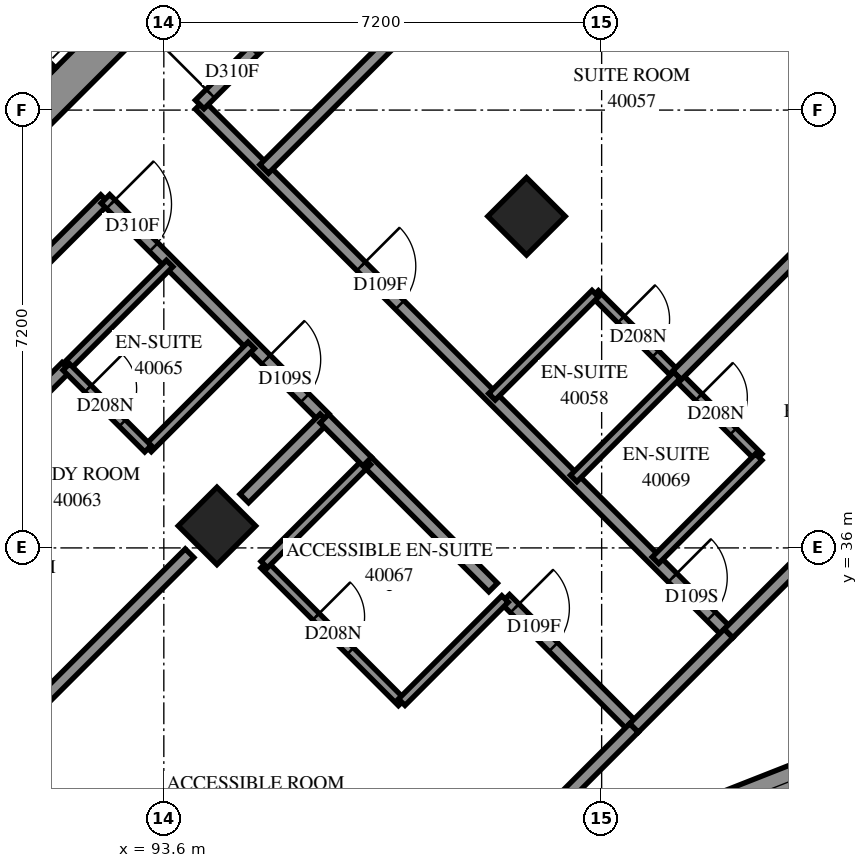
"""IFC4 building model, lengths in metres.
Left out: names, types, materials, properties, quantities, classifications, styles, units other than length and angle.
Written with IfcOpenShell. Run it as: python <this file> out.ifc"""

import sys

from ifc_helpers import new_model, si_unit, direction, frame, frame_2d, origin, origin_2d, place, context, subcontext, project, spatial, polyline, rectangle, outline, extrude, element, fill, save


model = new_model("IFC4")
c1 = context("Model", 3, precision=1e-05, world=origin(), true_north=direction((0.0, 1.0)))
c2 = subcontext(c1, "Body", "Model", "MODEL_VIEW")
j1 = project(units=[si_unit("LENGTHUNIT", "METRE"), si_unit("PLANEANGLEUNIT", "RADIAN")], contexts=[c1])
p1 = place(None, origin())
s1 = spatial("IfcSite", under=j1, at=p1, CompositionType="ELEMENT")
p2 = place(p1, origin())
s2 = spatial("IfcBuilding", under=s1, at=p2, CompositionType="ELEMENT")
p3 = place(p2, frame((0.0, 0.0, 149.0)))
s3 = spatial("IfcBuildingStorey", under=s2, at=p3, CompositionType="ELEMENT", Elevation=149.0)
for number, where, z_axis, x_axis in (
    (1, (99.565, 41.453, 0.0), (0.0, 0.0, 1.0), (0.707, -0.707, 0.0)),
    (2, (94.474, 36.362, 0.0), (0.0, 0.0, 1.0), (0.707, -0.707, 0.0)),
):
    element("IfcColumn", number, at=place(p3, frame(where, z_axis=z_axis, x_axis=x_axis)), inside=s3, PredefinedType="COLUMN", context=c2, shape_type="SweptSolid", body=[
        extrude(rectangle(XDim=0.9, YDim=0.9, at=origin_2d()), origin(), (0.0, 0.0, 1.0), 3.1),
    ])
p4 = place(p3, frame((87.049, 38.695, -0.3), z_axis=(0.0, 0.0, 1.0), x_axis=(0.7071067812, 0.7071067812, 0.0)))
e3 = element("IfcWall", 3, at=p4, inside=s3, PredefinedType="SHEAR", context=c2, shape_type="SweptSolid", body=[
    extrude(rectangle(XDim=14.4, YDim=0.6, at=frame_2d((7.2, 0.0))), origin(), (0.0, 0.0, 1.0), 2.7),
])
p5 = place(p4, frame((4.55, 0.0, 0.3)))
e4 = element("IfcOpeningElement", 4, at=p5, cuts=e3, PredefinedType="OPENING", context=c2, shape_type="SweptSolid", body=[
    extrude(rectangle(XDim=1.1, YDim=2.1, at=frame_2d((0.55, 1.05))), frame((0.0, 0.31, 0.0), z_axis=(0.0, -1.0, 0.0), x_axis=(1.0, 0.0, 0.0)), (0.0, 0.0, 1.0), 0.62),
])
p6 = place(p4, frame((11.35, 0.0, 0.3)))
e5 = element("IfcOpeningElement", 5, at=p6, cuts=e3, PredefinedType="OPENING", context=c2, shape_type="SweptSolid", body=[
    extrude(rectangle(XDim=1.1, YDim=2.1, at=frame_2d((0.55, 1.05))), frame((0.0, 0.31, 0.0), z_axis=(0.0, -1.0, 0.0), x_axis=(1.0, 0.0, 0.0)), (0.0, 0.0, 1.0), 0.62),
])
p7 = place(p3, frame((81.534, 53.969, 0.0), z_axis=(0.0, 0.0, 1.0), x_axis=(0.707103309, -0.7071102534, 0.0)))
e6 = element("IfcWall", 6, at=p7, inside=s3, PredefinedType="SOLIDWALL", context=c2, shape_type="SweptSolid", body=[
    extrude(rectangle(XDim=14.4, YDim=0.3, at=frame_2d((7.2, 0.0))), origin(), (0.0, 0.0, 1.0), 3.1),
])
p8 = place(p7, frame((1.25, 0.0, 0.0)))
e7 = element("IfcOpeningElement", 7, at=p8, cuts=e6, PredefinedType="OPENING", context=c2, shape_type="SweptSolid", body=[
    extrude(rectangle(XDim=1.1, YDim=2.1, at=frame_2d((0.55, 1.05))), frame((0.0, 0.16, 0.0), z_axis=(0.0, -1.0, 0.0), x_axis=(1.0, 0.0, 0.0)), (0.0, 0.0, 1.0), 0.32),
])
p9 = place(p7, frame((4.85, 0.0, 0.0)))
e8 = element("IfcOpeningElement", 8, at=p9, cuts=e6, PredefinedType="OPENING", context=c2, shape_type="SweptSolid", body=[
    extrude(rectangle(XDim=1.1, YDim=2.1, at=frame_2d((0.55, 1.05))), frame((0.0, 0.16, 0.0), z_axis=(0.0, -1.0, 0.0), x_axis=(1.0, 0.0, 0.0)), (0.0, 0.0, 1.0), 0.32),
])
p10 = place(p7, frame((8.45, 0.0, 0.0)))
e9 = element("IfcOpeningElement", 9, at=p10, cuts=e6, PredefinedType="OPENING", context=c2, shape_type="SweptSolid", body=[
    extrude(rectangle(XDim=1.1, YDim=2.1, at=frame_2d((0.55, 1.05))), frame((0.0, 0.16, 0.0), z_axis=(0.0, -1.0, 0.0), x_axis=(1.0, 0.0, 0.0)), (0.0, 0.0, 1.0), 0.32),
])
p11 = place(p7, frame((12.05, 0.0, 0.0)))
e10 = element("IfcOpeningElement", 10, at=p11, cuts=e6, PredefinedType="OPENING", context=c2, shape_type="SweptSolid", body=[
    extrude(rectangle(XDim=1.1, YDim=2.1, at=frame_2d((0.55, 1.05))), frame((0.0, 0.16, 0.0), z_axis=(0.0, -1.0, 0.0), x_axis=(1.0, 0.0, 0.0)), (0.0, 0.0, 1.0), 0.32),
])
p12 = place(p3, frame((100.849, 30.961, 0.0), z_axis=(0.0, 0.0, 1.0), x_axis=(0.9305330954, 0.3662078077, 0.0)))
e11 = element("IfcWall", 11, at=p12, inside=s3, PredefinedType="SOLIDWALL", context=c2, shape_type="SweptSolid", body=[
    extrude(outline(polyline([(0.109, -0.25), (5.622, -0.25), (5.395, 0.25), (-0.109, 0.25), (0.109, -0.25)])), origin(), (0.0, 0.0, 1.0), 3.1),
])
p13 = place(p12, frame((0.608, 0.0, 0.45)))
e12 = element("IfcOpeningElement", 12, at=p13, cuts=e11, PredefinedType="OPENING", context=c2, shape_type="SweptSolid", body=[
    extrude(rectangle(XDim=2.8, YDim=2.5, at=frame_2d((1.4, 1.25))), frame((0.0, 0.26, 0.0), z_axis=(0.0, -1.0, 0.0), x_axis=(1.0, 0.0, 0.0)), (0.0, 0.0, 1.0), 0.52),
])
p14 = place(p3, frame((94.189, 43.287, 0.0), z_axis=(0.0, 0.0, 1.0), x_axis=(0.7071067812, -0.7071067812, 0.0)))
e13 = element("IfcWall", 13, at=p14, inside=s3, PredefinedType="PARTITIONING", context=c2, shape_type="SweptSolid", body=[
    extrude(rectangle(XDim=12.298, YDim=0.2, at=frame_2d((6.149, 0.0))), origin(), (0.0, 0.0, 1.0), 3.1),
])
p15 = place(p14, frame((3.755, 0.0, 0.0)))
e14 = element("IfcOpeningElement", 14, at=p15, cuts=e13, PredefinedType="OPENING", context=c2, shape_type="SweptSolid", body=[
    extrude(rectangle(XDim=0.9, YDim=2.1, at=frame_2d((0.45, 1.05))), frame((0.0, 0.11, 0.0), z_axis=(0.0, -1.0, 0.0), x_axis=(1.0, 0.0, 0.0)), (0.0, 0.0, 1.0), 0.22),
])
p16 = place(p14, frame((10.998, 0.0, 0.0)))
e15 = element("IfcOpeningElement", 15, at=p16, cuts=e13, PredefinedType="OPENING", context=c2, shape_type="SweptSolid", body=[
    extrude(rectangle(XDim=0.9, YDim=2.1, at=frame_2d((0.45, 1.05))), frame((0.0, 0.11, 0.0), z_axis=(0.0, -1.0, 0.0), x_axis=(1.0, 0.0, 0.0)), (0.0, 0.0, 1.0), 0.22),
])
p17 = place(p3, frame((95.25, 42.232, 0.0), z_axis=(0.0, 0.0, 1.0), x_axis=(0.7071114274, 0.7071021349, 0.0)))
e16 = element("IfcWall", 16, at=p17, inside=s3, PredefinedType="PARTITIONING", context=c2, shape_type="SweptSolid", body=[
    extrude(rectangle(XDim=10.761, YDim=0.2, at=frame_2d((5.381, 0.0))), origin(), (0.0, 0.0, 1.0), 3.1),
])
p18 = place(p3, frame((94.19, 43.292, 0.0), z_axis=(0.0, 0.0, 1.0), x_axis=(0.7071067812, 0.7071067812, 0.0)))
e17 = element("IfcWall", 17, at=p18, inside=s3, PredefinedType="PARTITIONING", context=c2, shape_type="SweptSolid", body=[
    extrude(rectangle(XDim=8.2, YDim=0.2, at=frame_2d((4.1, 0.0))), origin(), (0.0, 0.0, 1.0), 3.1),
])
p19 = place(p18, frame((0.251, 0.0, 0.0)))
e18 = element("IfcOpeningElement", 18, at=p19, cuts=e17, PredefinedType="OPENING", context=c2, shape_type="SweptSolid", body=[
    extrude(rectangle(XDim=1.0, YDim=2.1, at=frame_2d((0.5, 1.05))), frame((0.0, 0.11, 0.0), z_axis=(0.0, -1.0, 0.0), x_axis=(1.0, 0.0, 0.0)), (0.0, 0.0, 1.0), 0.22),
])
p20 = place(p3, frame((86.836, 35.938, 0.0), z_axis=(0.0, 0.0, 1.0), x_axis=(0.7071067812, 0.7071067812, 0.0)))
e19 = element("IfcWall", 19, at=p20, inside=s3, PredefinedType="PARTITIONING", context=c2, shape_type="SweptSolid", body=[
    extrude(rectangle(XDim=8.2, YDim=0.2, at=frame_2d((4.1, 0.0))), origin(), (0.0, 0.0, 1.0), 3.1),
])
p21 = place(p3, frame((86.33, 33.311, 0.0), z_axis=(0.0, 0.0, 1.0), x_axis=(0.7071005427, 0.7071130196, 0.0)))
e20 = element("IfcWall", 20, at=p21, inside=s3, PredefinedType="PARTITIONING", context=c2, shape_type="SweptSolid", body=[
    extrude(rectangle(XDim=8.015, YDim=0.2, at=frame_2d((4.007, 0.0))), origin(), (0.0, 0.0, 1.0), 3.1),
])
p22 = place(p3, frame((89.831, 31.721, 0.0), z_axis=(0.0, 0.0, 1.0), x_axis=(0.7071067812, 0.7071067812, 0.0)))
e21 = element("IfcWall", 21, at=p22, inside=s3, PredefinedType="PARTITIONING", context=c2, shape_type="SweptSolid", body=[
    extrude(rectangle(XDim=5.928, YDim=0.2, at=frame_2d((2.964, 0.0))), origin(), (0.0, 0.0, 1.0), 3.1),
])
p23 = place(p3, frame((92.639, 41.739, 0.0), z_axis=(0.0, 0.0, 1.0), x_axis=(0.7071067812, -0.7071067812, 0.0)))
e22 = element("IfcWall", 22, at=p23, inside=s3, PredefinedType="PARTITIONING", context=c2, shape_type="SweptSolid", body=[
    extrude(rectangle(XDim=5.1, YDim=0.2, at=frame_2d((2.55, 0.0))), origin(), (0.0, 0.0, 1.0), 3.1),
])
p24 = place(p23, frame((0.123, 0.0, 0.0)))
e23 = element("IfcOpeningElement", 23, at=p24, cuts=e22, PredefinedType="OPENING", context=c2, shape_type="SweptSolid", body=[
    extrude(rectangle(XDim=1.0, YDim=2.1, at=frame_2d((0.5, 1.05))), frame((0.0, 0.11, 0.0), z_axis=(0.0, -1.0, 0.0), x_axis=(1.0, 0.0, 0.0)), (0.0, 0.0, 1.0), 0.22),
])
p25 = place(p23, frame((3.734, 0.0, 0.0)))
e24 = element("IfcOpeningElement", 24, at=p25, cuts=e22, PredefinedType="OPENING", context=c2, shape_type="SweptSolid", body=[
    extrude(rectangle(XDim=0.9, YDim=2.1, at=frame_2d((0.45, 1.05))), frame((0.0, 0.11, 0.0), z_axis=(0.0, -1.0, 0.0), x_axis=(1.0, 0.0, 0.0)), (0.0, 0.0, 1.0), 0.22),
])
p26 = place(p3, frame((100.694, 40.178, 0.0), z_axis=(0.0, 0.0, 1.0), x_axis=(0.7076329021, -0.7065802685, 0.0)))
e25 = element("IfcWall", 25, at=p26, inside=s3, PredefinedType="PARTITIONING", context=c2, shape_type="SweptSolid", body=[
    extrude(rectangle(XDim=3.8, YDim=0.15, at=frame_2d((1.9, 0.0))), origin(), (0.0, 0.0, 1.0), 3.1),
])
p27 = place(p26, frame((0.598, 0.0, 0.0)))
e26 = element("IfcOpeningElement", 26, at=p27, cuts=e25, PredefinedType="OPENING", context=c2, shape_type="SweptSolid", body=[
    extrude(rectangle(XDim=0.8, YDim=2.1, at=frame_2d((0.4, 1.05))), frame((0.0, 0.085, 0.0), z_axis=(0.0, -1.0, 0.0), x_axis=(1.0, 0.0, 0.0)), (0.0, 0.0, 1.0), 0.17),
])
p28 = place(p26, frame((2.405, 0.0, 0.0)))
e27 = element("IfcOpeningElement", 27, at=p28, cuts=e25, PredefinedType="OPENING", context=c2, shape_type="SweptSolid", body=[
    extrude(rectangle(XDim=0.8, YDim=2.1, at=frame_2d((0.4, 1.05))), frame((0.0, 0.085, 0.0), z_axis=(0.0, -1.0, 0.0), x_axis=(1.0, 0.0, 0.0)), (0.0, 0.0, 1.0), 0.17),
])
p29 = place(p3, frame((95.249, 35.723, 0.0), z_axis=(0.0, 0.0, 1.0), x_axis=(0.7067942478, -0.7074191764, 0.0)))
e28 = element("IfcWall", 28, at=p29, inside=s3, PredefinedType="PARTITIONING", context=c2, shape_type="SweptSolid", body=[
    extrude(rectangle(XDim=3.2, YDim=0.15, at=frame_2d((1.6, 0.0))), origin(), (0.0, 0.0, 1.0), 3.1),
])
p30 = place(p29, frame((1.206, 0.0, 0.0)))
e29 = element("IfcOpeningElement", 29, at=p30, cuts=e28, PredefinedType="OPENING", context=c2, shape_type="SweptSolid", body=[
    extrude(rectangle(XDim=0.8, YDim=2.1, at=frame_2d((0.4, 1.05))), frame((0.0, 0.085, 0.0), z_axis=(0.0, -1.0, 0.0), x_axis=(1.0, 0.0, 0.0)), (0.0, 0.0, 1.0), 0.17),
])
p31 = place(p3, frame((102.04, 38.838, 0.0), z_axis=(0.0, 0.0, 1.0), x_axis=(0.7071067812, 0.7071067812, 0.0)))
e30 = element("IfcWall", 30, at=p31, inside=s3, PredefinedType="PARTITIONING", context=c2, shape_type="SweptSolid", body=[
    extrude(rectangle(XDim=3.199, YDim=0.2, at=frame_2d((1.599, 0.0))), origin(), (0.0, 0.0, 1.0), 3.1),
])
p32 = place(p3, frame((99.214, 35.162, 0.0), z_axis=(0.0, 0.0, 1.0), x_axis=(0.706773319, -0.7074400862, 0.0)))
e31 = element("IfcWall", 31, at=p32, inside=s3, PredefinedType="PARTITIONING", context=c2, shape_type="SweptSolid", body=[
    extrude(rectangle(XDim=2.999, YDim=0.2, at=frame_2d((1.5, 0.0))), origin(), (0.0, 0.0, 1.0), 3.1),
])
p33 = place(p32, frame((0.22, 0.0, 0.0)))
e32 = element("IfcOpeningElement", 32, at=p33, cuts=e31, PredefinedType="OPENING", context=c2, shape_type="SweptSolid", body=[
    extrude(rectangle(XDim=0.9, YDim=2.1, at=frame_2d((0.45, 1.05))), frame((0.0, 0.11, 0.0), z_axis=(0.0, -1.0, 0.0), x_axis=(1.0, 0.0, 0.0)), (0.0, 0.0, 1.0), 0.22),
])
p34 = place(p3, frame((96.945, 37.419, 0.0), z_axis=(0.0, 0.0, 1.0), x_axis=(0.7071067812, -0.7071067812, 0.0)))
e33 = element("IfcWall", 33, at=p34, inside=s3, PredefinedType="PARTITIONING", context=c2, shape_type="SweptSolid", body=[
    extrude(rectangle(XDim=2.927, YDim=0.2, at=frame_2d((1.464, 0.0))), origin(), (0.0, 0.0, 1.0), 3.1),
])
for number, where, z_axis, x_axis in (
    (34, (97.513, 33.463, 0.0), (0.0, 0.0, 1.0), (0.707, 0.707, 0.0)),
    (35, (93.341, 37.635, 0.0), (0.0, 0.0, 1.0), (0.707, 0.707, 0.0)),
    (36, (101.685, 35.797, 0.0), (0.0, 0.0, 1.0), (0.707, 0.707, 0.0)),
    (37, (91.997, 38.979, 0.0), (0.0, 0.0, 1.0), (0.707, 0.707, 0.0)),
):
    element("IfcWall", number, at=place(p3, frame(where, z_axis=z_axis, x_axis=x_axis)), inside=s3, PredefinedType="PARTITIONING", context=c2, shape_type="SweptSolid", body=[
        extrude(rectangle(XDim=2.401, YDim=0.15, at=frame_2d((1.201, 0.0))), origin(), (0.0, 0.0, 1.0), 3.1),
    ])
for number, where, z_axis, x_axis in (
    (38, (100.34, 37.142, 0.0), (0.0, 0.0, 1.0), (0.708, 0.707, 0.0)),
    (39, (98.996, 38.486, 0.0), (0.0, 0.0, 1.0), (0.708, 0.707, 0.0)),
):
    element("IfcWall", number, at=place(p3, frame(where, z_axis=z_axis, x_axis=x_axis)), inside=s3, PredefinedType="PARTITIONING", context=c2, shape_type="SweptSolid", body=[
        extrude(rectangle(XDim=2.4, YDim=0.15, at=frame_2d((1.2, 0.0))), origin(), (0.0, 0.0, 1.0), 3.1),
    ])
p35 = place(p3, frame((95.251, 35.727, 0.0), z_axis=(0.0, 0.0, 1.0), x_axis=(0.7071067812, 0.7071067812, 0.0)))
e40 = element("IfcWall", 40, at=p35, inside=s3, PredefinedType="PARTITIONING", context=c2, shape_type="SweptSolid", body=[
    extrude(rectangle(XDim=2.398, YDim=0.15, at=frame_2d((1.199, 0.0))), origin(), (0.0, 0.0, 1.0), 3.1),
])
p36 = place(p3, frame((101.331, 33.039, 0.0), z_axis=(0.0, 0.0, 1.0), x_axis=(0.7071067812, 0.7071067812, 0.0)))
e41 = element("IfcWall", 41, at=p36, inside=s3, PredefinedType="PARTITIONING", context=c2, shape_type="SweptSolid", body=[
    extrude(rectangle(XDim=2.2, YDim=0.2, at=frame_2d((1.1, 0.0))), origin(), (0.0, 0.0, 1.0), 2.6),
])
p37 = place(p3, frame((91.995, 38.975, 0.0), z_axis=(0.0, 0.0, 1.0), x_axis=(0.7071067812, -0.7071067812, 0.0)))
e42 = element("IfcWall", 42, at=p37, inside=s3, PredefinedType="PARTITIONING", context=c2, shape_type="SweptSolid", body=[
    extrude(rectangle(XDim=1.901, YDim=0.15, at=frame_2d((0.95, 0.0))), origin(), (0.0, 0.0, 1.0), 3.1),
])
p38 = place(p37, frame((0.506, 0.0, 0.0)))
e43 = element("IfcOpeningElement", 43, at=p38, cuts=e42, PredefinedType="OPENING", context=c2, shape_type="SweptSolid", body=[
    extrude(rectangle(XDim=0.8, YDim=2.1, at=frame_2d((0.4, 1.05))), frame((0.0, 0.085, 0.0), z_axis=(0.0, -1.0, 0.0), x_axis=(1.0, 0.0, 0.0)), (0.0, 0.0, 1.0), 0.17),
])
p39 = place(p3, frame((102.887, 34.595, 0.0), z_axis=(0.0, 0.0, 1.0), x_axis=(0.7071067812, 0.7071067812, 0.0)))
e44 = element("IfcWall", 44, at=p39, inside=s3, PredefinedType="PARTITIONING", context=c2, shape_type="SweptSolid", body=[
    extrude(rectangle(XDim=1.864, YDim=0.2, at=frame_2d((0.932, 0.0))), origin(), (0.0, 0.0, 1.0), 2.6),
])
p40 = place(p3, frame((94.923, 36.813, 0.0), z_axis=(0.0, 0.0, 1.0), x_axis=(0.7071067812, 0.7071067812, 0.0)))
e45 = element("IfcWall", 45, at=p40, inside=s3, PredefinedType="PARTITIONING", context=c2, shape_type="SweptSolid", body=[
    extrude(rectangle(XDim=1.864, YDim=0.2, at=frame_2d((0.932, 0.0))), origin(), (0.0, 0.0, 1.0), 3.1),
])
p41 = place(p3, frame((100.013, 31.721, 0.0), z_axis=(0.0, 0.0, 1.0), x_axis=(0.7071067812, 0.7071067812, 0.0)))
e46 = element("IfcWall", 46, at=p41, inside=s3, PredefinedType="PARTITIONING", context=c2, shape_type="SweptSolid", body=[
    extrude(rectangle(XDim=1.864, YDim=0.2, at=frame_2d((0.932, 0.0))), origin(), (0.0, 0.0, 1.0), 2.6),
])
p42 = place(p3, frame((96.24, 38.128, 0.0), z_axis=(0.0, 0.0, 1.0), x_axis=(0.7061059238, -0.7081062239, 0.0)))
e47 = element("IfcWall", 47, at=p42, inside=s3, PredefinedType="PARTITIONING", context=c2, shape_type="SweptSolid", body=[
    extrude(rectangle(XDim=1.0, YDim=0.2, at=frame_2d((0.5, 0.0))), origin(), (0.0, 0.0, 1.0), 3.1),
])
p43 = place(p13, origin())
e48 = element("IfcWindow", 48, at=p43, inside=s3, PartitioningType="SINGLE_PANEL", PredefinedType="WINDOW", context=c2, shape_type="SweptSolid", body=[
    extrude(rectangle(XDim=2.8, YDim=2.5, at=frame_2d((1.4, 1.25))), frame((0.0, 0.18, 0.0), z_axis=(0.0, -1.0, 0.0), x_axis=(1.0, 0.0, 0.0)), (0.0, 0.0, 1.0), 0.06),
])
fill(e12, e48)
p44 = place(p19, origin())
e49 = element("IfcDoor", 49, at=p44, inside=s3, OperationType="SINGLE_SWING_RIGHT", PredefinedType="DOOR", context=c2, shape_type="SweptSolid", body=[
    extrude(rectangle(XDim=1.0, YDim=2.1, at=frame_2d((0.5, 1.05))), frame((0.0, 0.025, 0.0), z_axis=(0.0, -1.0, 0.0), x_axis=(1.0, 0.0, 0.0)), (0.0, 0.0, 1.0), 0.05),
])
fill(e18, e49)
p45 = place(p15, origin())
e50 = element("IfcDoor", 50, at=p45, inside=s3, OperationType="SINGLE_SWING_RIGHT", PredefinedType="DOOR", context=c2, shape_type="SweptSolid", body=[
    extrude(rectangle(XDim=0.9, YDim=2.1, at=frame_2d((0.45, 1.05))), frame((0.0, 0.025, 0.0), z_axis=(0.0, -1.0, 0.0), x_axis=(1.0, 0.0, 0.0)), (0.0, 0.0, 1.0), 0.05),
])
fill(e14, e50)
p46 = place(p27, origin())
e51 = element("IfcDoor", 51, at=p46, inside=s3, OperationType="SINGLE_SWING_RIGHT", PredefinedType="DOOR", context=c2, shape_type="SweptSolid", body=[
    extrude(rectangle(XDim=0.8, YDim=2.1, at=frame_2d((0.4, 1.05))), frame((0.0, 0.025, 0.0), z_axis=(0.0, -1.0, 0.0), x_axis=(1.0, 0.0, 0.0)), (0.0, 0.0, 1.0), 0.05),
])
fill(e26, e51)
p47 = place(p24, origin())
e52 = element("IfcDoor", 52, at=p47, inside=s3, OperationType="SINGLE_SWING_RIGHT", PredefinedType="DOOR", context=c2, shape_type="SweptSolid", body=[
    extrude(rectangle(XDim=1.0, YDim=2.1, at=frame_2d((0.5, 1.05))), frame((0.0, 0.025, 0.0), z_axis=(0.0, -1.0, 0.0), x_axis=(1.0, 0.0, 0.0)), (0.0, 0.0, 1.0), 0.05),
])
fill(e23, e52)
p48 = place(p25, origin())
e53 = element("IfcDoor", 53, at=p48, inside=s3, OperationType="SINGLE_SWING_LEFT", PredefinedType="DOOR", context=c2, shape_type="SweptSolid", body=[
    extrude(rectangle(XDim=0.9, YDim=2.1, at=frame_2d((0.45, 1.05))), frame((0.0, 0.025, 0.0), z_axis=(0.0, -1.0, 0.0), x_axis=(1.0, 0.0, 0.0)), (0.0, 0.0, 1.0), 0.05),
])
fill(e24, e53)
p49 = place(p38, origin())
e54 = element("IfcDoor", 54, at=p49, inside=s3, OperationType="SINGLE_SWING_RIGHT", PredefinedType="DOOR", context=c2, shape_type="SweptSolid", body=[
    extrude(rectangle(XDim=0.8, YDim=2.1, at=frame_2d((0.4, 1.05))), frame((0.0, 0.025, 0.0), z_axis=(0.0, -1.0, 0.0), x_axis=(1.0, 0.0, 0.0)), (0.0, 0.0, 1.0), 0.05),
])
fill(e43, e54)
p50 = place(p33, origin())
e55 = element("IfcDoor", 55, at=p50, inside=s3, OperationType="SINGLE_SWING_RIGHT", PredefinedType="DOOR", context=c2, shape_type="SweptSolid", body=[
    extrude(rectangle(XDim=0.9, YDim=2.1, at=frame_2d((0.45, 1.05))), frame((0.0, 0.025, 0.0), z_axis=(0.0, -1.0, 0.0), x_axis=(1.0, 0.0, 0.0)), (0.0, 0.0, 1.0), 0.05),
])
fill(e32, e55)
p51 = place(p30, origin())
e56 = element("IfcDoor", 56, at=p51, inside=s3, OperationType="SINGLE_SWING_RIGHT", PredefinedType="DOOR", context=c2, shape_type="SweptSolid", body=[
    extrude(rectangle(XDim=0.8, YDim=2.1, at=frame_2d((0.4, 1.05))), frame((0.0, 0.025, 0.0), z_axis=(0.0, -1.0, 0.0), x_axis=(1.0, 0.0, 0.0)), (0.0, 0.0, 1.0), 0.05),
])
fill(e29, e56)
p52 = place(p16, origin())
e57 = element("IfcDoor", 57, at=p52, inside=s3, OperationType="SINGLE_SWING_RIGHT", PredefinedType="DOOR", context=c2, shape_type="SweptSolid", body=[
    extrude(rectangle(XDim=0.9, YDim=2.1, at=frame_2d((0.45, 1.05))), frame((0.0, 0.025, 0.0), z_axis=(0.0, -1.0, 0.0), x_axis=(1.0, 0.0, 0.0)), (0.0, 0.0, 1.0), 0.05),
])
fill(e15, e57)
p53 = place(p28, origin())
e58 = element("IfcDoor", 58, at=p53, inside=s3, OperationType="SINGLE_SWING_RIGHT", PredefinedType="DOOR", context=c2, shape_type="SweptSolid", body=[
    extrude(rectangle(XDim=0.8, YDim=2.1, at=frame_2d((0.4, 1.05))), frame((0.0, 0.025, 0.0), z_axis=(0.0, -1.0, 0.0), x_axis=(1.0, 0.0, 0.0)), (0.0, 0.0, 1.0), 0.05),
])
fill(e27, e58)
save(model, sys.argv[1])
